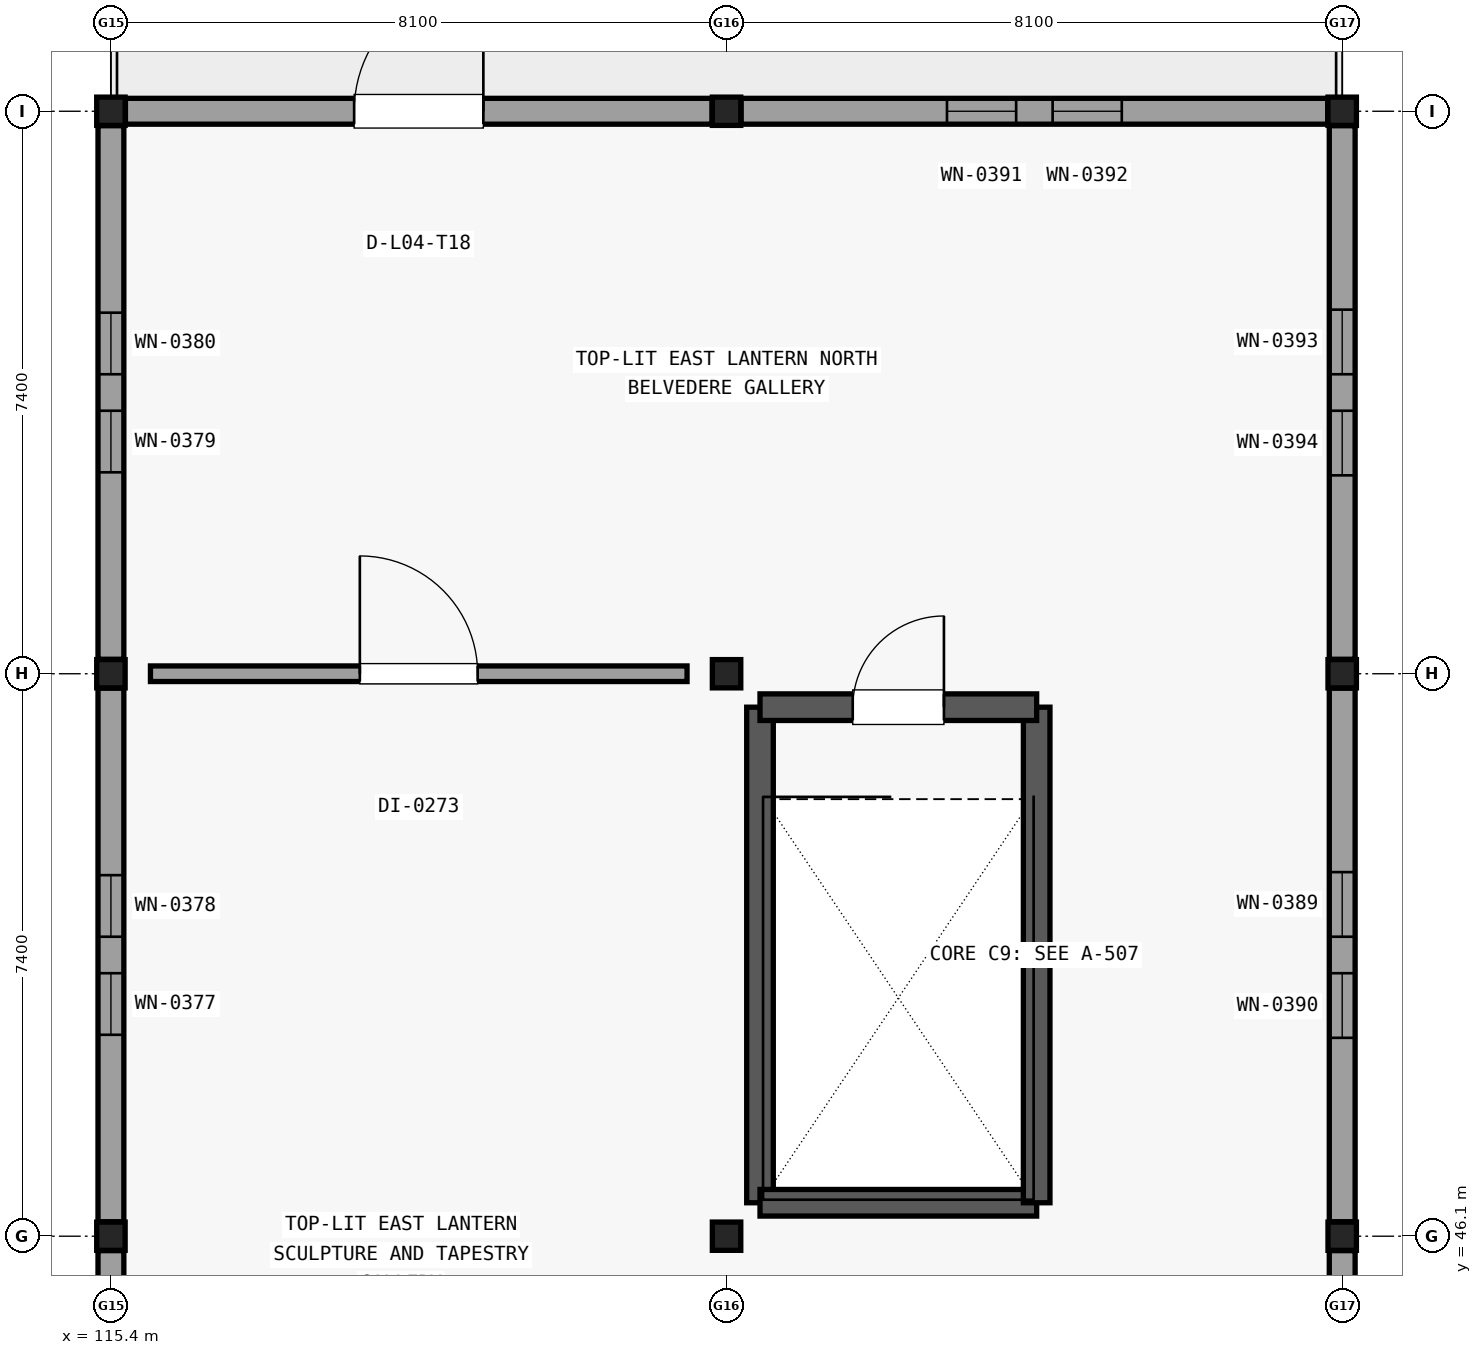
"""IFC4 building model, lengths in metres.
Left out: names, types, materials, properties, quantities, classifications, styles, units other than length and angle.
Written with IfcOpenShell. Run it as: python <this file> out.ifc"""

import sys

from ifc_helpers import new_model, si_unit, direction, frame, frame_2d, origin, origin_2d, place, context, subcontext, project, spatial, rectangle, i_section, extrude, element, fill, save


model = new_model("IFC4")
c1 = context("Model", 3, precision=1e-05, world=origin(), true_north=direction((0.0, 1.0)))
c2 = subcontext(c1, "Body", "Model", "MODEL_VIEW")
j1 = project(units=[si_unit("LENGTHUNIT", "METRE"), si_unit("PLANEANGLEUNIT", "RADIAN")], contexts=[c1])
p1 = place(None, origin())
s1 = spatial("IfcSite", under=j1, at=p1, CompositionType="ELEMENT")
p2 = place(p1, origin())
s2 = spatial("IfcBuilding", under=s1, at=p2, CompositionType="ELEMENT")
p3 = place(p2, frame((0.0, 0.0, 17.4)))
s3 = spatial("IfcBuildingStorey", under=s2, at=p3, CompositionType="ELEMENT", Elevation=17.4)
for number, where, z_axis, x_axis in (
    (1, (115.4, 46.1, 0.0), (0.0, 0.0, 1.0), (1.0, 0.0, 0.0)),
    (2, (115.4, 53.5, 0.0), (0.0, 0.0, 1.0), (1.0, 0.0, 0.0)),
    (3, (115.4, 60.9, 0.0), (0.0, 0.0, 1.0), (1.0, 0.0, 0.0)),
    (4, (123.5, 46.1, 0.0), (0.0, 0.0, 1.0), (1.0, 0.0, 0.0)),
    (5, (123.5, 53.5, 0.0), (0.0, 0.0, 1.0), (1.0, 0.0, 0.0)),
    (6, (123.5, 60.9, 0.0), (0.0, 0.0, 1.0), (1.0, 0.0, 0.0)),
    (7, (131.6, 46.1, 0.0), (0.0, 0.0, 1.0), (1.0, 0.0, 0.0)),
    (8, (131.6, 53.5, 0.0), (0.0, 0.0, 1.0), (1.0, 0.0, 0.0)),
    (9, (131.6, 60.9, 0.0), (0.0, 0.0, 1.0), (1.0, 0.0, 0.0)),
):
    element("IfcColumn", number, at=place(p3, frame(where, z_axis=z_axis, x_axis=x_axis)), inside=s3, PredefinedType="COLUMN", context=c2, shape_type="SweptSolid", body=[
        extrude(i_section(OverallWidth=0.374, OverallDepth=0.372, WebThickness=0.016, FlangeThickness=0.026, at=origin_2d()), origin(), (0.0, 0.0, 1.0), 3.38),
    ])
p4 = place(p3, frame((115.4, 38.89, 0.0), z_axis=(0.0, 0.0, 1.0), x_axis=(0.0, 1.0, 0.0)))
e10 = element("IfcWall", 10, at=p4, inside=s3, PredefinedType="SOLIDWALL", context=c2, shape_type="SweptSolid", body=[
    extrude(rectangle(XDim=7.02, YDim=0.34, at=frame_2d((3.51, 0.0))), origin(), (0.0, 0.0, 1.0), 2.908),
])
p5 = place(p4, frame((2.46, 0.0, 0.6)))
e11 = element("IfcOpeningElement", 11, at=p5, cuts=e10, PredefinedType="OPENING", context=c2, shape_type="SweptSolid", body=[
    extrude(rectangle(XDim=0.81, YDim=1.84, at=frame_2d((0.405, 0.92))), frame((0.0, 0.18, 0.0), z_axis=(0.0, -1.0, 0.0), x_axis=(1.0, 0.0, 0.0)), (0.0, 0.0, 1.0), 0.36),
])
p6 = place(p4, frame((3.75, 0.0, 0.6)))
e12 = element("IfcOpeningElement", 12, at=p6, cuts=e10, PredefinedType="OPENING", context=c2, shape_type="SweptSolid", body=[
    extrude(rectangle(XDim=0.81, YDim=1.84, at=frame_2d((0.405, 0.92))), frame((0.0, 0.18, 0.0), z_axis=(0.0, -1.0, 0.0), x_axis=(1.0, 0.0, 0.0)), (0.0, 0.0, 1.0), 0.36),
])
p7 = place(p3, frame((115.4, 46.29, 0.0), z_axis=(0.0, 0.0, 1.0), x_axis=(0.0, 1.0, 0.0)))
e13 = element("IfcWall", 13, at=p7, inside=s3, PredefinedType="SOLIDWALL", context=c2, shape_type="SweptSolid", body=[
    extrude(rectangle(XDim=7.02, YDim=0.34, at=frame_2d((3.51, 0.0))), origin(), (0.0, 0.0, 1.0), 2.908),
])
p8 = place(p7, frame((2.46, 0.0, 0.6)))
e14 = element("IfcOpeningElement", 14, at=p8, cuts=e13, PredefinedType="OPENING", context=c2, shape_type="SweptSolid", body=[
    extrude(rectangle(XDim=0.81, YDim=1.84, at=frame_2d((0.405, 0.92))), frame((0.0, 0.18, 0.0), z_axis=(0.0, -1.0, 0.0), x_axis=(1.0, 0.0, 0.0)), (0.0, 0.0, 1.0), 0.36),
])
p9 = place(p7, frame((3.75, 0.0, 0.6)))
e15 = element("IfcOpeningElement", 15, at=p9, cuts=e13, PredefinedType="OPENING", context=c2, shape_type="SweptSolid", body=[
    extrude(rectangle(XDim=0.81, YDim=1.84, at=frame_2d((0.405, 0.92))), frame((0.0, 0.18, 0.0), z_axis=(0.0, -1.0, 0.0), x_axis=(1.0, 0.0, 0.0)), (0.0, 0.0, 1.0), 0.36),
])
p10 = place(p3, frame((115.591, 60.9, 0.0), z_axis=(0.0, 0.0, 1.0), x_axis=(1.0, 0.0, 0.0)))
e16 = element("IfcWall", 16, at=p10, inside=s3, PredefinedType="SOLIDWALL", context=c2, shape_type="SweptSolid", body=[
    extrude(rectangle(XDim=7.718, YDim=0.34, at=frame_2d((3.859, 0.0))), origin(), (0.0, 0.0, 1.0), 2.908),
])
p11 = place(p10, frame((3.009, 0.0, 0.0)))
e17 = element("IfcOpeningElement", 17, at=p11, cuts=e16, PredefinedType="OPENING", context=c2, shape_type="SweptSolid", body=[
    extrude(rectangle(XDim=1.7, YDim=2.15, at=frame_2d((0.85, 1.075))), frame((0.0, 0.18, 0.0), z_axis=(0.0, -1.0, 0.0), x_axis=(1.0, 0.0, 0.0)), (0.0, 0.0, 1.0), 0.36),
])
p12 = place(p3, frame((115.4, 53.69, 0.0), z_axis=(0.0, 0.0, 1.0), x_axis=(0.0, 1.0, 0.0)))
e18 = element("IfcWall", 18, at=p12, inside=s3, PredefinedType="SOLIDWALL", context=c2, shape_type="SweptSolid", body=[
    extrude(rectangle(XDim=7.02, YDim=0.34, at=frame_2d((3.51, 0.0))), origin(), (0.0, 0.0, 1.0), 2.908),
])
p13 = place(p12, frame((2.46, 0.0, 0.6)))
e19 = element("IfcOpeningElement", 19, at=p13, cuts=e18, PredefinedType="OPENING", context=c2, shape_type="SweptSolid", body=[
    extrude(rectangle(XDim=0.81, YDim=1.84, at=frame_2d((0.405, 0.92))), frame((0.0, 0.18, 0.0), z_axis=(0.0, -1.0, 0.0), x_axis=(1.0, 0.0, 0.0)), (0.0, 0.0, 1.0), 0.36),
])
p14 = place(p12, frame((3.75, 0.0, 0.6)))
e20 = element("IfcOpeningElement", 20, at=p14, cuts=e18, PredefinedType="OPENING", context=c2, shape_type="SweptSolid", body=[
    extrude(rectangle(XDim=0.81, YDim=1.84, at=frame_2d((0.405, 0.92))), frame((0.0, 0.18, 0.0), z_axis=(0.0, -1.0, 0.0), x_axis=(1.0, 0.0, 0.0)), (0.0, 0.0, 1.0), 0.36),
])
p15 = place(p3, frame((131.6, 45.91, 0.0), z_axis=(0.0, 0.0, 1.0), x_axis=(0.0, -1.0, 0.0)))
e21 = element("IfcWall", 21, at=p15, inside=s3, PredefinedType="SOLIDWALL", context=c2, shape_type="SweptSolid", body=[
    extrude(rectangle(XDim=7.02, YDim=0.34, at=frame_2d((3.51, 0.0))), origin(), (0.0, 0.0, 1.0), 2.908),
])
p16 = place(p15, frame((2.42, 0.0, 0.6)))
e22 = element("IfcOpeningElement", 22, at=p16, cuts=e21, PredefinedType="OPENING", context=c2, shape_type="SweptSolid", body=[
    extrude(rectangle(XDim=0.85, YDim=1.88, at=frame_2d((0.425, 0.94))), frame((0.0, 0.18, 0.0), z_axis=(0.0, -1.0, 0.0), x_axis=(1.0, 0.0, 0.0)), (0.0, 0.0, 1.0), 0.36),
])
p17 = place(p15, frame((3.75, 0.0, 0.6)))
e23 = element("IfcOpeningElement", 23, at=p17, cuts=e21, PredefinedType="OPENING", context=c2, shape_type="SweptSolid", body=[
    extrude(rectangle(XDim=0.85, YDim=1.88, at=frame_2d((0.425, 0.94))), frame((0.0, 0.18, 0.0), z_axis=(0.0, -1.0, 0.0), x_axis=(1.0, 0.0, 0.0)), (0.0, 0.0, 1.0), 0.36),
])
p18 = place(p3, frame((131.6, 53.31, 0.0), z_axis=(0.0, 0.0, 1.0), x_axis=(0.0, -1.0, 0.0)))
e24 = element("IfcWall", 24, at=p18, inside=s3, PredefinedType="SOLIDWALL", context=c2, shape_type="SweptSolid", body=[
    extrude(rectangle(XDim=7.02, YDim=0.34, at=frame_2d((3.51, 0.0))), origin(), (0.0, 0.0, 1.0), 2.908),
])
p19 = place(p18, frame((2.42, 0.0, 0.6)))
e25 = element("IfcOpeningElement", 25, at=p19, cuts=e24, PredefinedType="OPENING", context=c2, shape_type="SweptSolid", body=[
    extrude(rectangle(XDim=0.85, YDim=1.88, at=frame_2d((0.425, 0.94))), frame((0.0, 0.18, 0.0), z_axis=(0.0, -1.0, 0.0), x_axis=(1.0, 0.0, 0.0)), (0.0, 0.0, 1.0), 0.36),
])
p20 = place(p18, frame((3.75, 0.0, 0.6)))
e26 = element("IfcOpeningElement", 26, at=p20, cuts=e24, PredefinedType="OPENING", context=c2, shape_type="SweptSolid", body=[
    extrude(rectangle(XDim=0.85, YDim=1.88, at=frame_2d((0.425, 0.94))), frame((0.0, 0.18, 0.0), z_axis=(0.0, -1.0, 0.0), x_axis=(1.0, 0.0, 0.0)), (0.0, 0.0, 1.0), 0.36),
])
p21 = place(p3, frame((123.691, 60.9, 0.0), z_axis=(0.0, 0.0, 1.0), x_axis=(1.0, 0.0, 0.0)))
e27 = element("IfcWall", 27, at=p21, inside=s3, PredefinedType="SOLIDWALL", context=c2, shape_type="SweptSolid", body=[
    extrude(rectangle(XDim=7.718, YDim=0.34, at=frame_2d((3.859, 0.0))), origin(), (0.0, 0.0, 1.0), 2.908),
])
p22 = place(p21, frame((2.709, 0.0, 0.6)))
e28 = element("IfcOpeningElement", 28, at=p22, cuts=e27, PredefinedType="OPENING", context=c2, shape_type="SweptSolid", body=[
    extrude(rectangle(XDim=0.91, YDim=1.94, at=frame_2d((0.455, 0.97))), frame((0.0, 0.18, 0.0), z_axis=(0.0, -1.0, 0.0), x_axis=(1.0, 0.0, 0.0)), (0.0, 0.0, 1.0), 0.36),
])
p23 = place(p21, frame((4.099, 0.0, 0.6)))
e29 = element("IfcOpeningElement", 29, at=p23, cuts=e27, PredefinedType="OPENING", context=c2, shape_type="SweptSolid", body=[
    extrude(rectangle(XDim=0.91, YDim=1.94, at=frame_2d((0.455, 0.97))), frame((0.0, 0.18, 0.0), z_axis=(0.0, -1.0, 0.0), x_axis=(1.0, 0.0, 0.0)), (0.0, 0.0, 1.0), 0.36),
])
p24 = place(p3, frame((131.6, 60.71, 0.0), z_axis=(0.0, 0.0, 1.0), x_axis=(0.0, -1.0, 0.0)))
e30 = element("IfcWall", 30, at=p24, inside=s3, PredefinedType="SOLIDWALL", context=c2, shape_type="SweptSolid", body=[
    extrude(rectangle(XDim=7.02, YDim=0.34, at=frame_2d((3.51, 0.0))), origin(), (0.0, 0.0, 1.0), 2.908),
])
p25 = place(p24, frame((2.42, 0.0, 0.6)))
e31 = element("IfcOpeningElement", 31, at=p25, cuts=e30, PredefinedType="OPENING", context=c2, shape_type="SweptSolid", body=[
    extrude(rectangle(XDim=0.85, YDim=1.88, at=frame_2d((0.425, 0.94))), frame((0.0, 0.18, 0.0), z_axis=(0.0, -1.0, 0.0), x_axis=(1.0, 0.0, 0.0)), (0.0, 0.0, 1.0), 0.36),
])
p26 = place(p24, frame((3.75, 0.0, 0.6)))
e32 = element("IfcOpeningElement", 32, at=p26, cuts=e30, PredefinedType="OPENING", context=c2, shape_type="SweptSolid", body=[
    extrude(rectangle(XDim=0.85, YDim=1.88, at=frame_2d((0.425, 0.94))), frame((0.0, 0.18, 0.0), z_axis=(0.0, -1.0, 0.0), x_axis=(1.0, 0.0, 0.0)), (0.0, 0.0, 1.0), 0.36),
])
p27 = place(p3, frame((123.94, 46.54, 0.0), z_axis=(0.0, 0.0, 1.0), x_axis=(0.0, 1.0, 0.0)))
e33 = element("IfcWall", 33, at=p27, inside=s3, PredefinedType="SHEAR", context=c2, shape_type="SweptSolid", body=[
    extrude(rectangle(XDim=6.52, YDim=0.35, at=frame_2d((3.26, 0.0))), origin(), (0.0, 0.0, 1.0), 3.375),
])
p28 = place(p3, frame((123.94, 46.54, 0.0), z_axis=(0.0, 0.0, 1.0), x_axis=(1.0, 0.0, 0.0)))
e34 = element("IfcWall", 34, at=p28, inside=s3, PredefinedType="SHEAR", context=c2, shape_type="SweptSolid", body=[
    extrude(rectangle(XDim=3.64, YDim=0.35, at=frame_2d((1.82, 0.0))), origin(), (0.0, 0.0, 1.0), 3.375),
])
p29 = place(p3, frame((127.58, 46.54, 0.0), z_axis=(0.0, 0.0, 1.0), x_axis=(0.0, 1.0, 0.0)))
e35 = element("IfcWall", 35, at=p29, inside=s3, PredefinedType="SHEAR", context=c2, shape_type="SweptSolid", body=[
    extrude(rectangle(XDim=6.52, YDim=0.35, at=frame_2d((3.26, 0.0))), origin(), (0.0, 0.0, 1.0), 3.375),
])
p30 = place(p3, frame((123.94, 53.06, 0.0), z_axis=(0.0, 0.0, 1.0), x_axis=(1.0, 0.0, 0.0)))
e36 = element("IfcWall", 36, at=p30, inside=s3, PredefinedType="SHEAR", context=c2, shape_type="SweptSolid", body=[
    extrude(rectangle(XDim=3.64, YDim=0.35, at=frame_2d((1.82, 0.0))), origin(), (0.0, 0.0, 1.0), 3.375),
])
p31 = place(p30, frame((1.22, 0.0, 0.0)))
e37 = element("IfcOpeningElement", 37, at=p31, cuts=e36, PredefinedType="OPENING", context=c2, shape_type="SweptSolid", body=[
    extrude(rectangle(XDim=1.2, YDim=2.15, at=frame_2d((0.6, 1.075))), frame((0.0, 0.185, 0.0), z_axis=(0.0, -1.0, 0.0), x_axis=(1.0, 0.0, 0.0)), (0.0, 0.0, 1.0), 0.37),
])
p32 = place(p3, frame((115.92, 53.5, 0.0), z_axis=(0.0, 0.0, 1.0), x_axis=(1.0, 0.0, 0.0)))
e38 = element("IfcWall", 38, at=p32, inside=s3, PredefinedType="PARTITIONING", context=c2, shape_type="SweptSolid", body=[
    extrude(rectangle(XDim=7.06, YDim=0.205, at=frame_2d((3.53, 0.0))), origin(), (0.0, 0.0, 1.0), 2.913),
])
p33 = place(p32, frame((2.755, 0.0, 0.0)))
e39 = element("IfcOpeningElement", 39, at=p33, cuts=e38, PredefinedType="OPENING", context=c2, shape_type="SweptSolid", body=[
    extrude(rectangle(XDim=1.55, YDim=2.2, at=frame_2d((0.775, 1.1))), frame((0.0, 0.113, 0.0), z_axis=(0.0, -1.0, 0.0), x_axis=(1.0, 0.0, 0.0)), (0.0, 0.0, 1.0), 0.225),
])
p34 = place(p8, origin())
e40 = element("IfcWindow", 40, at=p34, inside=s3, PartitioningType="SINGLE_PANEL", PredefinedType="WINDOW", context=c2, shape_type="SweptSolid", body=[
    extrude(rectangle(XDim=0.81, YDim=1.84, at=frame_2d((0.405, 0.92))), frame((0.0, 0.03, 0.0), z_axis=(0.0, -1.0, 0.0), x_axis=(1.0, 0.0, 0.0)), (0.0, 0.0, 1.0), 0.06),
])
fill(e14, e40)
p35 = place(p9, origin())
e41 = element("IfcWindow", 41, at=p35, inside=s3, PartitioningType="SINGLE_PANEL", PredefinedType="WINDOW", context=c2, shape_type="SweptSolid", body=[
    extrude(rectangle(XDim=0.81, YDim=1.84, at=frame_2d((0.405, 0.92))), frame((0.0, 0.03, 0.0), z_axis=(0.0, -1.0, 0.0), x_axis=(1.0, 0.0, 0.0)), (0.0, 0.0, 1.0), 0.06),
])
fill(e15, e41)
p36 = place(p11, origin())
e42 = element("IfcDoor", 42, at=p36, inside=s3, OperationType="SINGLE_SWING_RIGHT", PredefinedType="DOOR", context=c2, shape_type="SweptSolid", body=[
    extrude(rectangle(XDim=1.7, YDim=2.15, at=frame_2d((0.85, 1.075))), frame((0.0, 0.025, 0.0), z_axis=(0.0, -1.0, 0.0), x_axis=(1.0, 0.0, 0.0)), (0.0, 0.0, 1.0), 0.05),
])
fill(e17, e42)
p37 = place(p13, origin())
e43 = element("IfcWindow", 43, at=p37, inside=s3, PartitioningType="SINGLE_PANEL", PredefinedType="WINDOW", context=c2, shape_type="SweptSolid", body=[
    extrude(rectangle(XDim=0.81, YDim=1.84, at=frame_2d((0.405, 0.92))), frame((0.0, 0.03, 0.0), z_axis=(0.0, -1.0, 0.0), x_axis=(1.0, 0.0, 0.0)), (0.0, 0.0, 1.0), 0.06),
])
fill(e19, e43)
p38 = place(p14, origin())
e44 = element("IfcWindow", 44, at=p38, inside=s3, PartitioningType="SINGLE_PANEL", PredefinedType="WINDOW", context=c2, shape_type="SweptSolid", body=[
    extrude(rectangle(XDim=0.81, YDim=1.84, at=frame_2d((0.405, 0.92))), frame((0.0, 0.03, 0.0), z_axis=(0.0, -1.0, 0.0), x_axis=(1.0, 0.0, 0.0)), (0.0, 0.0, 1.0), 0.06),
])
fill(e20, e44)
p39 = place(p19, origin())
e45 = element("IfcWindow", 45, at=p39, inside=s3, PartitioningType="SINGLE_PANEL", PredefinedType="WINDOW", context=c2, shape_type="SweptSolid", body=[
    extrude(rectangle(XDim=0.85, YDim=1.88, at=frame_2d((0.425, 0.94))), frame((0.0, 0.03, 0.0), z_axis=(0.0, -1.0, 0.0), x_axis=(1.0, 0.0, 0.0)), (0.0, 0.0, 1.0), 0.06),
])
fill(e25, e45)
p40 = place(p20, origin())
e46 = element("IfcWindow", 46, at=p40, inside=s3, PartitioningType="SINGLE_PANEL", PredefinedType="WINDOW", context=c2, shape_type="SweptSolid", body=[
    extrude(rectangle(XDim=0.85, YDim=1.88, at=frame_2d((0.425, 0.94))), frame((0.0, 0.03, 0.0), z_axis=(0.0, -1.0, 0.0), x_axis=(1.0, 0.0, 0.0)), (0.0, 0.0, 1.0), 0.06),
])
fill(e26, e46)
p41 = place(p22, origin())
e47 = element("IfcWindow", 47, at=p41, inside=s3, PartitioningType="SINGLE_PANEL", PredefinedType="WINDOW", context=c2, shape_type="SweptSolid", body=[
    extrude(rectangle(XDim=0.91, YDim=1.94, at=frame_2d((0.455, 0.97))), frame((0.0, 0.03, 0.0), z_axis=(0.0, -1.0, 0.0), x_axis=(1.0, 0.0, 0.0)), (0.0, 0.0, 1.0), 0.06),
])
fill(e28, e47)
p42 = place(p23, origin())
e48 = element("IfcWindow", 48, at=p42, inside=s3, PartitioningType="SINGLE_PANEL", PredefinedType="WINDOW", context=c2, shape_type="SweptSolid", body=[
    extrude(rectangle(XDim=0.91, YDim=1.94, at=frame_2d((0.455, 0.97))), frame((0.0, 0.03, 0.0), z_axis=(0.0, -1.0, 0.0), x_axis=(1.0, 0.0, 0.0)), (0.0, 0.0, 1.0), 0.06),
])
fill(e29, e48)
p43 = place(p25, origin())
e49 = element("IfcWindow", 49, at=p43, inside=s3, PartitioningType="SINGLE_PANEL", PredefinedType="WINDOW", context=c2, shape_type="SweptSolid", body=[
    extrude(rectangle(XDim=0.85, YDim=1.88, at=frame_2d((0.425, 0.94))), frame((0.0, 0.03, 0.0), z_axis=(0.0, -1.0, 0.0), x_axis=(1.0, 0.0, 0.0)), (0.0, 0.0, 1.0), 0.06),
])
fill(e31, e49)
p44 = place(p26, origin())
e50 = element("IfcWindow", 50, at=p44, inside=s3, PartitioningType="SINGLE_PANEL", PredefinedType="WINDOW", context=c2, shape_type="SweptSolid", body=[
    extrude(rectangle(XDim=0.85, YDim=1.88, at=frame_2d((0.425, 0.94))), frame((0.0, 0.03, 0.0), z_axis=(0.0, -1.0, 0.0), x_axis=(1.0, 0.0, 0.0)), (0.0, 0.0, 1.0), 0.06),
])
fill(e32, e50)
p45 = place(p31, origin())
e51 = element("IfcDoor", 51, at=p45, inside=s3, OperationType="SINGLE_SWING_RIGHT", PredefinedType="DOOR", context=c2, shape_type="SweptSolid", body=[
    extrude(rectangle(XDim=1.2, YDim=2.15, at=frame_2d((0.6, 1.075))), frame((0.0, 0.025, 0.0), z_axis=(0.0, -1.0, 0.0), x_axis=(1.0, 0.0, 0.0)), (0.0, 0.0, 1.0), 0.05),
])
fill(e37, e51)
p46 = place(p33, origin())
e52 = element("IfcDoor", 52, at=p46, inside=s3, OperationType="SINGLE_SWING_LEFT", PredefinedType="DOOR", context=c2, shape_type="SweptSolid", body=[
    extrude(rectangle(XDim=1.55, YDim=2.2, at=frame_2d((0.775, 1.1))), frame((0.0, 0.025, 0.0), z_axis=(0.0, -1.0, 0.0), x_axis=(1.0, 0.0, 0.0)), (0.0, 0.0, 1.0), 0.05),
])
fill(e39, e52)
save(model, sys.argv[1])
